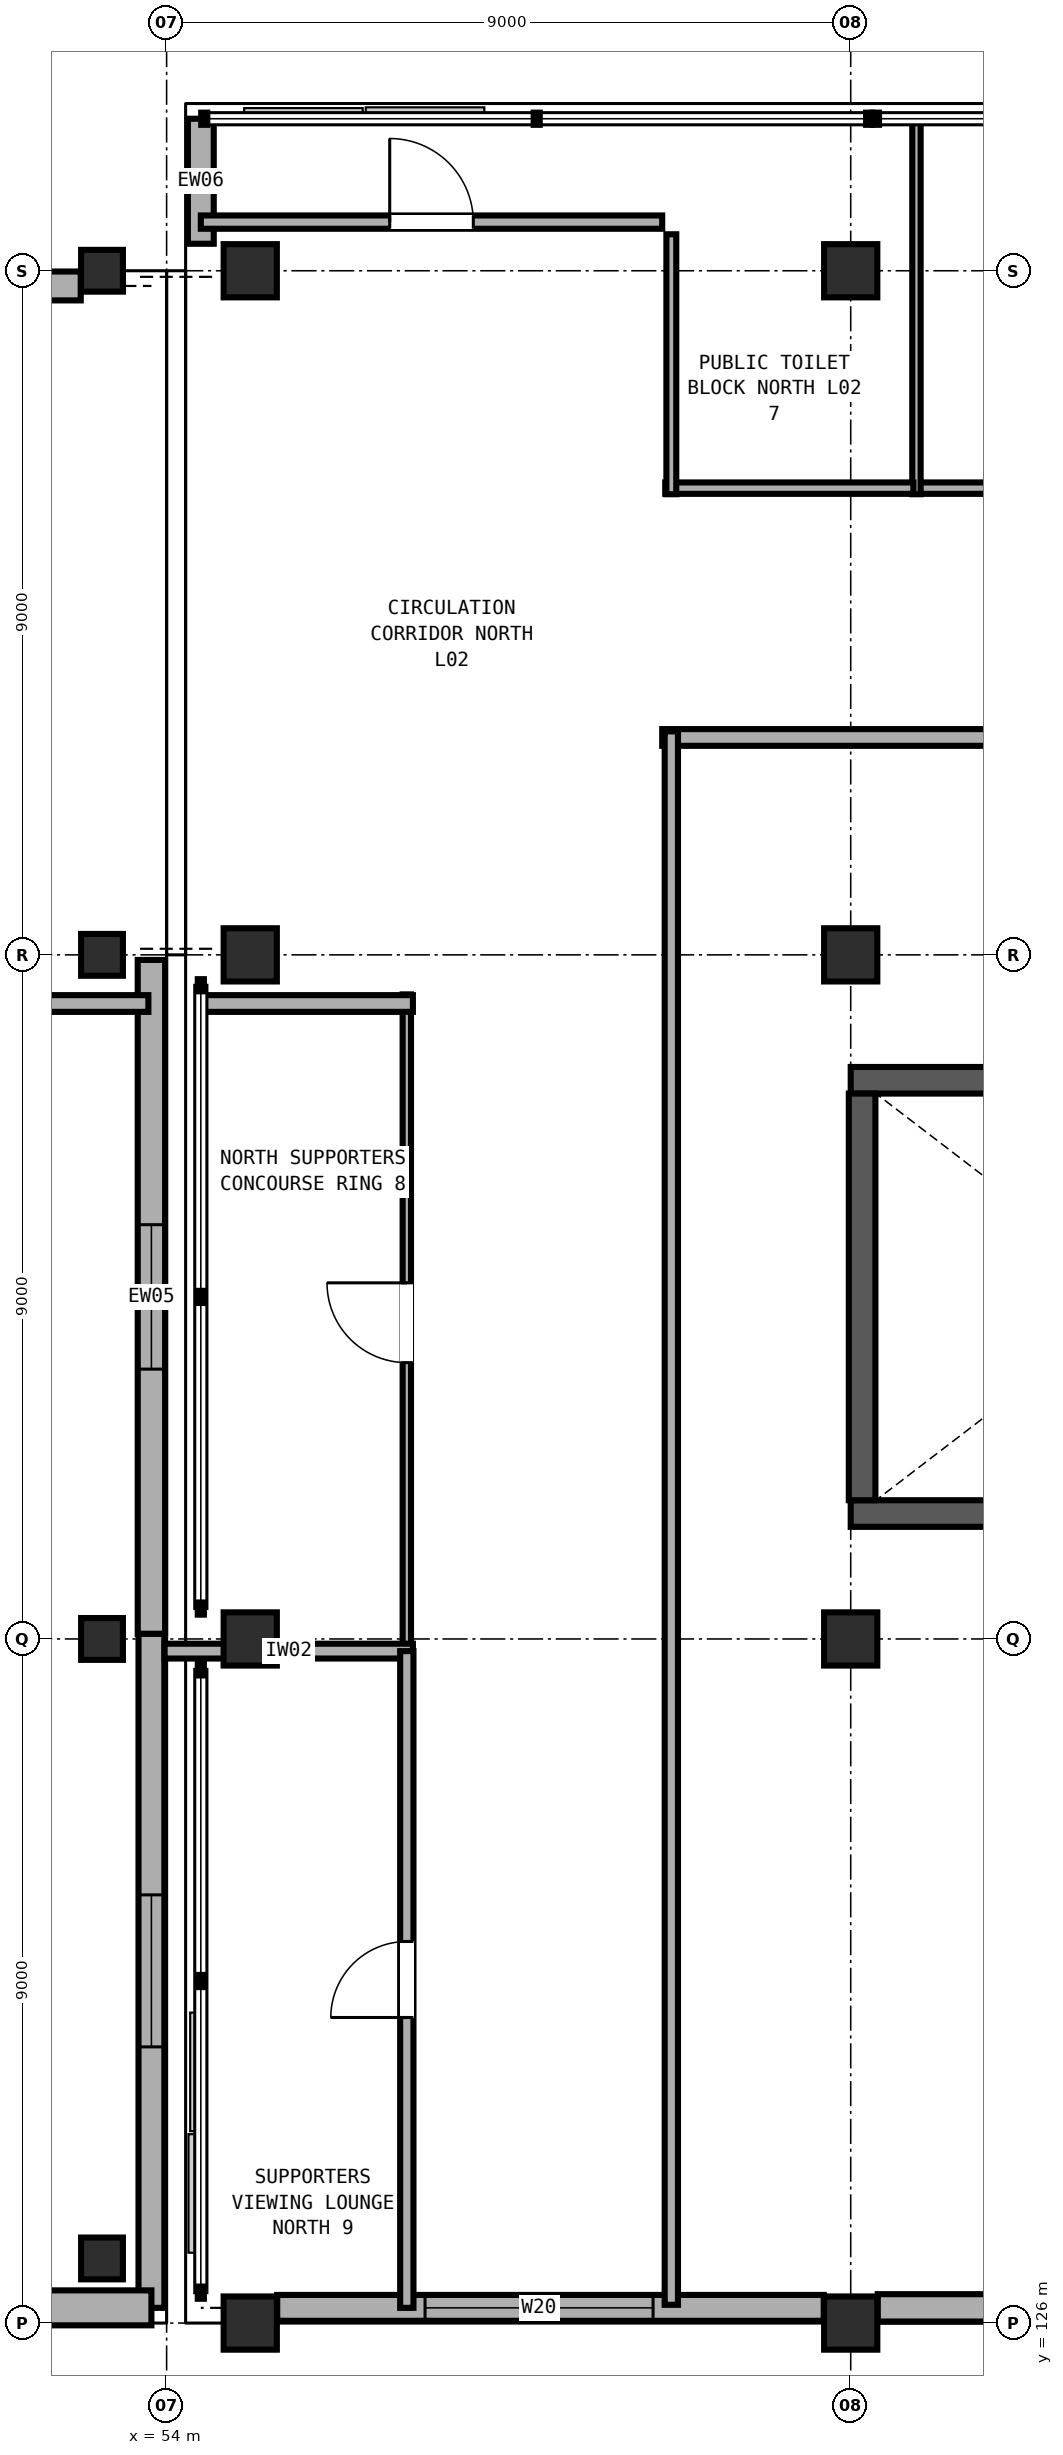
"""IFC4 building model, lengths in metres.
Left out: names, types, materials, properties, quantities, classifications, styles, units other than length and angle.
Written with IfcOpenShell. Run it as: python <this file> out.ifc"""

import sys

from ifc_helpers import new_model, si_unit, direction, frame, frame_2d, origin, origin_2d, place, context, subcontext, project, spatial, rectangle, extrude, element, fill, save


model = new_model("IFC4")
c1 = context("Model", 3, precision=1e-05, world=origin(), true_north=direction((0.0, 1.0)))
c2 = subcontext(c1, "Body", "Model", "MODEL_VIEW")
j1 = project(units=[si_unit("LENGTHUNIT", "METRE"), si_unit("PLANEANGLEUNIT", "RADIAN")], contexts=[c1])
p1 = place(None, origin())
s1 = spatial("IfcSite", under=j1, at=p1, CompositionType="ELEMENT")
p2 = place(p1, origin())
s2 = spatial("IfcBuilding", under=s1, at=p2, CompositionType="ELEMENT")
p3 = place(p2, frame((0.0, 0.0, 9.6)))
s3 = spatial("IfcBuildingStorey", under=s2, at=p3, CompositionType="ELEMENT", Elevation=9.6)
for number, where, z_axis, x_axis in (
    (1, (55.1, 126.0, 0.0), (0.0, 0.0, 1.0), (1.0, 0.0, 0.0)),
    (2, (55.1, 135.0, 0.0), (0.0, 0.0, 1.0), (1.0, 0.0, 0.0)),
    (3, (55.1, 144.0, 0.0), (0.0, 0.0, 1.0), (1.0, 0.0, 0.0)),
    (4, (55.1, 153.0, 0.0), (0.0, 0.0, 1.0), (1.0, 0.0, 0.0)),
    (5, (63.0, 126.0, 0.0), (0.0, 0.0, 1.0), (1.0, 0.0, 0.0)),
    (6, (63.0, 135.0, 0.0), (0.0, 0.0, 1.0), (1.0, 0.0, 0.0)),
    (7, (63.0, 144.0, 0.0), (0.0, 0.0, 1.0), (1.0, 0.0, 0.0)),
    (8, (63.0, 153.0, 0.0), (0.0, 0.0, 1.0), (1.0, 0.0, 0.0)),
):
    element("IfcColumn", number, at=place(p3, frame(where, z_axis=z_axis, x_axis=x_axis)), inside=s3, PredefinedType="COLUMN", context=c2, shape_type="SweptSolid", body=[
        extrude(rectangle(XDim=0.7, YDim=0.7, at=origin_2d()), origin(), (0.0, 0.0, 1.0), 4.8),
    ])
for number, where, z_axis, x_axis in (
    (9, (53.15, 126.85, 0.0), (0.0, 0.0, 1.0), (1.0, 0.0, 0.0)),
    (10, (53.15, 135.0, 0.0), (0.0, 0.0, 1.0), (1.0, 0.0, 0.0)),
    (11, (53.15, 144.0, 0.0), (0.0, 0.0, 1.0), (1.0, 0.0, 0.0)),
    (12, (53.15, 153.0, 0.0), (0.0, 0.0, 1.0), (1.0, 0.0, 0.0)),
):
    element("IfcColumn", number, at=place(p3, frame(where, z_axis=z_axis, x_axis=x_axis)), inside=s3, PredefinedType="COLUMN", context=c2, shape_type="SweptSolid", body=[
        extrude(rectangle(XDim=0.55, YDim=0.55, at=origin_2d()), origin(), (0.0, 0.0, 1.0), 4.8),
    ])
p4 = place(p3, frame((63.0, 136.65, 0.0), z_axis=(0.0, 0.0, 1.0), x_axis=(1.0, 0.0, 0.0)))
e13 = element("IfcWall", 13, at=p4, inside=s3, PredefinedType="SHEAR", context=c2, shape_type="SweptSolid", body=[
    extrude(rectangle(XDim=18.0, YDim=0.35, at=frame_2d((9.0, 0.0))), origin(), (0.0, 0.0, 1.0), 4.5),
])
p5 = place(p3, frame((81.0, 142.35, 0.0), z_axis=(0.0, 0.0, 1.0), x_axis=(-1.0, 0.0, 0.0)))
e14 = element("IfcWall", 14, at=p5, inside=s3, PredefinedType="SHEAR", context=c2, shape_type="SweptSolid", body=[
    extrude(rectangle(XDim=18.0, YDim=0.35, at=frame_2d((9.0, 0.0))), origin(), (0.0, 0.0, 1.0), 4.5),
])
p6 = place(p5, frame((4.7, 0.0, 0.0)))
e15 = element("IfcOpeningElement", 15, at=p6, cuts=e14, PredefinedType="OPENING", context=c2, shape_type="SweptSolid", body=[
    extrude(rectangle(XDim=1.9, YDim=2.25, at=frame_2d((0.95, 1.125))), frame((0.0, 0.185, 0.0), z_axis=(0.0, -1.0, 0.0), x_axis=(1.0, 0.0, 0.0)), (0.0, 0.0, 1.0), 0.37),
])
p7 = place(p3, frame((63.15, 142.175, 0.0), z_axis=(0.0, 0.0, 1.0), x_axis=(0.0, -1.0, 0.0)))
e16 = element("IfcWall", 16, at=p7, inside=s3, PredefinedType="SHEAR", context=c2, shape_type="SweptSolid", body=[
    extrude(rectangle(XDim=5.35, YDim=0.35, at=frame_2d((2.675, 0.0))), origin(), (0.0, 0.0, 1.0), 4.5),
])
p8 = place(p3, frame((54.45, 153.355, 0.0), z_axis=(0.0, 0.0, 1.0), x_axis=(0.0, 1.0, 0.0)))
e17 = element("IfcWall", 17, at=p8, inside=s3, PredefinedType="SOLIDWALL", context=c2, shape_type="SweptSolid", body=[
    extrude(rectangle(XDim=1.645, YDim=0.34, at=frame_2d((0.823, 0.0))), origin(), (0.0, 0.0, 1.0), 3.58),
])
p9 = place(p3, frame((71.645, 126.2, 0.0), z_axis=(0.0, 0.0, 1.0), x_axis=(-1.0, 0.0, 0.0)))
e18 = element("IfcWall", 18, at=p9, inside=s3, PredefinedType="SOLIDWALL", context=c2, shape_type="SweptSolid", body=[
    extrude(rectangle(XDim=8.29, YDim=0.36, at=frame_2d((4.145, 0.0))), origin(), (0.0, 0.0, 1.0), 3.58),
])
p10 = place(p9, frame((2.695, 0.0, 0.9)))
e19 = element("IfcOpeningElement", 19, at=p10, cuts=e18, PredefinedType="OPENING", context=c2, shape_type="SweptSolid", body=[
    extrude(rectangle(XDim=2.9, YDim=2.2, at=frame_2d((1.45, 1.1))), frame((0.0, 0.19, 0.0), z_axis=(0.0, -1.0, 0.0), x_axis=(1.0, 0.0, 0.0)), (0.0, 0.0, 1.0), 0.38),
])
p11 = place(p3, frame((62.645, 126.2, 0.0), z_axis=(0.0, 0.0, 1.0), x_axis=(-1.0, 0.0, 0.0)))
e20 = element("IfcWall", 20, at=p11, inside=s3, PredefinedType="SOLIDWALL", context=c2, shape_type="SweptSolid", body=[
    extrude(rectangle(XDim=7.19, YDim=0.34, at=frame_2d((3.595, 0.0))), origin(), (0.0, 0.0, 1.0), 3.58),
])
p12 = place(p11, frame((2.245, 0.0, 0.9)))
e21 = element("IfcOpeningElement", 21, at=p12, cuts=e20, PredefinedType="OPENING", context=c2, shape_type="SweptSolid", body=[
    extrude(rectangle(XDim=3.0, YDim=2.2, at=frame_2d((1.5, 1.1))), frame((0.0, 0.18, 0.0), z_axis=(0.0, -1.0, 0.0), x_axis=(1.0, 0.0, 0.0)), (0.0, 0.0, 1.0), 0.36),
])
p13 = place(p3, frame((45.28, 152.8, 0.0), z_axis=(0.0, 0.0, 1.0), x_axis=(1.0, 0.0, 0.0)))
e22 = element("IfcWall", 22, at=p13, inside=s3, PredefinedType="SOLIDWALL", context=c2, shape_type="SweptSolid", body=[
    extrude(rectangle(XDim=7.59, YDim=0.38, at=frame_2d((3.795, 0.0))), origin(), (0.0, 0.0, 1.0), 3.58),
])
p14 = place(p13, frame((2.895, 0.0, 0.9)))
e23 = element("IfcOpeningElement", 23, at=p14, cuts=e22, PredefinedType="OPENING", context=c2, shape_type="SweptSolid", body=[
    extrude(rectangle(XDim=1.8, YDim=1.75, at=frame_2d((0.9, 0.875))), frame((0.0, 0.2, 0.0), z_axis=(0.0, -1.0, 0.0), x_axis=(1.0, 0.0, 0.0)), (0.0, 0.0, 1.0), 0.4),
])
p15 = place(p3, frame((53.8, 143.933, 0.0), z_axis=(0.0, 0.0, 1.0), x_axis=(0.0, -1.0, 0.0)))
e24 = element("IfcWall", 24, at=p15, inside=s3, PredefinedType="SOLIDWALL", context=c2, shape_type="SweptSolid", body=[
    extrude(rectangle(XDim=8.867, YDim=0.36, at=frame_2d((4.433, 0.0))), origin(), (0.0, 0.0, 1.0), 3.58),
])
p16 = place(p15, frame((3.483, 0.0, 0.9)))
e25 = element("IfcOpeningElement", 25, at=p16, cuts=e24, PredefinedType="OPENING", context=c2, shape_type="SweptSolid", body=[
    extrude(rectangle(XDim=1.9, YDim=1.8, at=frame_2d((0.95, 0.9))), frame((0.0, 0.19, 0.0), z_axis=(0.0, -1.0, 0.0), x_axis=(1.0, 0.0, 0.0)), (0.0, 0.0, 1.0), 0.38),
])
p17 = place(p3, frame((53.8, 135.067, 0.0), z_axis=(0.0, 0.0, 1.0), x_axis=(0.0, -1.0, 0.0)))
e26 = element("IfcWall", 26, at=p17, inside=s3, PredefinedType="SOLIDWALL", context=c2, shape_type="SweptSolid", body=[
    extrude(rectangle(XDim=8.867, YDim=0.34, at=frame_2d((4.433, 0.0))), origin(), (0.0, 0.0, 1.0), 3.58),
])
p18 = place(p17, frame((3.433, 0.0, 0.9)))
e27 = element("IfcOpeningElement", 27, at=p18, cuts=e26, PredefinedType="OPENING", context=c2, shape_type="SweptSolid", body=[
    extrude(rectangle(XDim=2.0, YDim=1.85, at=frame_2d((1.0, 0.925))), frame((0.0, 0.18, 0.0), z_axis=(0.0, -1.0, 0.0), x_axis=(1.0, 0.0, 0.0)), (0.0, 0.0, 1.0), 0.36),
])
p19 = place(p3, frame((53.8, 126.2, 0.0), z_axis=(0.0, 0.0, 1.0), x_axis=(-1.0, 0.0, 0.0)))
e28 = element("IfcWall", 28, at=p19, inside=s3, PredefinedType="SOLIDWALL", context=c2, shape_type="SweptSolid", body=[
    extrude(rectangle(XDim=8.92, YDim=0.46, at=frame_2d((4.46, 0.0))), origin(), (0.0, 0.0, 1.0), 3.58),
])
p20 = place(p19, frame((3.41, 0.0, 0.9)))
e29 = element("IfcOpeningElement", 29, at=p20, cuts=e28, PredefinedType="OPENING", context=c2, shape_type="SweptSolid", body=[
    extrude(rectangle(XDim=2.1, YDim=1.9, at=frame_2d((1.05, 0.95))), frame((0.0, 0.24, 0.0), z_axis=(0.0, -1.0, 0.0), x_axis=(1.0, 0.0, 0.0)), (0.0, 0.0, 1.0), 0.48),
])
p21 = place(p3, frame((73.28, 146.86, 0.0), z_axis=(0.0, 0.0, 1.0), x_axis=(-1.0, 0.0, 0.0)))
e30 = element("IfcWall", 30, at=p21, inside=s3, PredefinedType="PARTITIONING", context=c2, shape_type="SweptSolid", body=[
    extrude(rectangle(XDim=12.76, YDim=0.22, at=frame_2d((6.38, 0.0))), origin(), (0.0, 0.0, 1.0), 3.56),
])
p22 = place(p21, frame((5.605, 0.0, 0.0)))
e31 = element("IfcOpeningElement", 31, at=p22, cuts=e30, PredefinedType="OPENING", context=c2, shape_type="SweptSolid", body=[
    extrude(rectangle(XDim=1.55, YDim=2.2, at=frame_2d((0.775, 1.1))), frame((0.0, 0.12, 0.0), z_axis=(0.0, -1.0, 0.0), x_axis=(1.0, 0.0, 0.0)), (0.0, 0.0, 1.0), 0.24),
])
p23 = place(p3, frame((60.64, 126.24, 0.0), z_axis=(0.0, 0.0, 1.0), x_axis=(0.0, 1.0, 0.0)))
e32 = element("IfcWall", 32, at=p23, inside=s3, PredefinedType="PARTITIONING", context=c2, shape_type="SweptSolid", body=[
    extrude(rectangle(XDim=20.7, YDim=0.175, at=frame_2d((10.35, 0.0))), origin(), (0.0, 0.0, 1.0), 3.56),
])
p24 = place(p3, frame((63.865, 150.14, 0.0), z_axis=(0.0, 0.0, 1.0), x_axis=(1.0, 0.0, 0.0)))
e33 = element("IfcWall", 33, at=p24, inside=s3, PredefinedType="PARTITIONING", context=c2, shape_type="SweptSolid", body=[
    extrude(rectangle(XDim=9.415, YDim=0.15, at=frame_2d((4.708, 0.0))), origin(), (0.0, 0.0, 1.0), 3.56),
])
p25 = place(p24, frame((4.083, 0.0, 0.0)))
e34 = element("IfcOpeningElement", 34, at=p25, cuts=e33, PredefinedType="OPENING", context=c2, shape_type="SweptSolid", body=[
    extrude(rectangle(XDim=1.25, YDim=2.15, at=frame_2d((0.625, 1.075))), frame((0.0, 0.085, 0.0), z_axis=(0.0, -1.0, 0.0), x_axis=(1.0, 0.0, 0.0)), (0.0, 0.0, 1.0), 0.17),
])
p26 = place(p3, frame((63.865, 150.06, 0.0), z_axis=(0.0, 0.0, 1.0), x_axis=(0.0, 1.0, 0.0)))
e35 = element("IfcWall", 35, at=p26, inside=s3, PredefinedType="PARTITIONING", context=c2, shape_type="SweptSolid", body=[
    extrude(rectangle(XDim=4.907, YDim=0.11, at=frame_2d((2.454, 0.0))), origin(), (0.0, 0.0, 1.0), 3.56),
])
p27 = place(p3, frame((54.45, 153.64, 0.0), z_axis=(0.0, 0.0, 1.0), x_axis=(1.0, 0.0, 0.0)))
e36 = element("IfcWall", 36, at=p27, inside=s3, PredefinedType="PARTITIONING", context=c2, shape_type="SweptSolid", body=[
    extrude(rectangle(XDim=6.07, YDim=0.175, at=frame_2d((3.035, 0.0))), origin(), (0.0, 0.0, 1.0), 3.56),
])
p28 = place(p27, frame((2.485, 0.0, 0.0)))
e37 = element("IfcOpeningElement", 37, at=p28, cuts=e36, PredefinedType="OPENING", context=c2, shape_type="SweptSolid", body=[
    extrude(rectangle(XDim=1.1, YDim=2.1, at=frame_2d((0.55, 1.05))), frame((0.0, 0.097, 0.0), z_axis=(0.0, -1.0, 0.0), x_axis=(1.0, 0.0, 0.0)), (0.0, 0.0, 1.0), 0.195),
])
p29 = place(p3, frame((63.825, 150.14, 0.0), z_axis=(0.0, 0.0, 1.0), x_axis=(-1.0, 0.0, 0.0)))
e38 = element("IfcWall", 38, at=p29, inside=s3, PredefinedType="PARTITIONING", context=c2, shape_type="SweptSolid", body=[
    extrude(rectangle(XDim=3.265, YDim=0.15, at=frame_2d((1.632, 0.0))), origin(), (0.0, 0.0, 1.0), 3.56),
])
p30 = place(p3, frame((60.64, 150.06, 0.0), z_axis=(0.0, 0.0, 1.0), x_axis=(0.0, 1.0, 0.0)))
e39 = element("IfcWall", 39, at=p30, inside=s3, PredefinedType="PARTITIONING", context=c2, shape_type="SweptSolid", body=[
    extrude(rectangle(XDim=3.42, YDim=0.13, at=frame_2d((1.71, 0.0))), origin(), (0.0, 0.0, 1.0), 3.56),
])
p31 = place(p3, frame((57.16, 134.84, 0.0), z_axis=(0.0, 0.0, 1.0), x_axis=(0.0, 1.0, 0.0)))
e40 = element("IfcWall", 40, at=p31, inside=s3, PredefinedType="PARTITIONING", context=c2, shape_type="SweptSolid", body=[
    extrude(rectangle(XDim=8.64, YDim=0.11, at=frame_2d((4.32, 0.0))), origin(), (0.0, 0.0, 1.0), 3.56),
])
p32 = place(p31, frame((3.795, 0.0, 0.0)))
e41 = element("IfcOpeningElement", 41, at=p32, cuts=e40, PredefinedType="OPENING", context=c2, shape_type="SweptSolid", body=[
    extrude(rectangle(XDim=1.05, YDim=2.1, at=frame_2d((0.525, 1.05))), frame((0.0, 0.065, 0.0), z_axis=(0.0, -1.0, 0.0), x_axis=(1.0, 0.0, 0.0)), (0.0, 0.0, 1.0), 0.13),
])
p33 = place(p3, frame((54.483, 143.36, 0.0), z_axis=(0.0, 0.0, 1.0), x_axis=(1.0, 0.0, 0.0)))
e42 = element("IfcWall", 42, at=p33, inside=s3, PredefinedType="PARTITIONING", context=c2, shape_type="SweptSolid", body=[
    extrude(rectangle(XDim=2.757, YDim=0.22, at=frame_2d((1.378, 0.0))), origin(), (0.0, 0.0, 1.0), 3.56),
])
p34 = place(p3, frame((57.24, 134.84, 0.0), z_axis=(0.0, 0.0, 1.0), x_axis=(-1.0, 0.0, 0.0)))
e43 = element("IfcWall", 43, at=p34, inside=s3, PredefinedType="PARTITIONING", context=c2, shape_type="SweptSolid", body=[
    extrude(rectangle(XDim=3.267, YDim=0.195, at=frame_2d((1.634, 0.0))), origin(), (0.0, 0.0, 1.0), 3.56),
])
p35 = place(p3, frame((57.16, 126.2, 0.0), z_axis=(0.0, 0.0, 1.0), x_axis=(0.0, 1.0, 0.0)))
e44 = element("IfcWall", 44, at=p35, inside=s3, PredefinedType="PARTITIONING", context=c2, shape_type="SweptSolid", body=[
    extrude(rectangle(XDim=8.64, YDim=0.175, at=frame_2d((4.32, 0.0))), origin(), (0.0, 0.0, 1.0), 3.56),
])
p36 = place(p35, frame((3.82, 0.0, 0.0)))
e45 = element("IfcOpeningElement", 45, at=p36, cuts=e44, PredefinedType="OPENING", context=c2, shape_type="SweptSolid", body=[
    extrude(rectangle(XDim=1.0, YDim=2.1, at=frame_2d((0.5, 1.05))), frame((0.0, 0.097, 0.0), z_axis=(0.0, -1.0, 0.0), x_axis=(1.0, 0.0, 0.0)), (0.0, 0.0, 1.0), 0.195),
])
p37 = place(p3, frame((50.75, 143.36, 0.0), z_axis=(0.0, 0.0, 1.0), x_axis=(1.0, 0.0, 0.0)))
e46 = element("IfcWall", 46, at=p37, inside=s3, PredefinedType="PARTITIONING", context=c2, shape_type="SweptSolid", body=[
    extrude(rectangle(XDim=3.01, YDim=0.22, at=frame_2d((1.505, 0.0))), origin(), (0.0, 0.0, 1.0), 3.56),
])
p38 = place(p12, origin())
e47 = element("IfcWindow", 47, at=p38, inside=s3, PartitioningType="DOUBLE_PANEL_VERTICAL", PredefinedType="WINDOW", context=c2, shape_type="SweptSolid", body=[
    extrude(rectangle(XDim=3.0, YDim=2.2, at=frame_2d((1.5, 1.1))), frame((0.0, 0.03, 0.0), z_axis=(0.0, -1.0, 0.0), x_axis=(1.0, 0.0, 0.0)), (0.0, 0.0, 1.0), 0.06),
])
fill(e21, e47)
p39 = place(p16, origin())
e48 = element("IfcWindow", 48, at=p39, inside=s3, PartitioningType="DOUBLE_PANEL_VERTICAL", PredefinedType="WINDOW", context=c2, shape_type="SweptSolid", body=[
    extrude(rectangle(XDim=1.9, YDim=1.8, at=frame_2d((0.95, 0.9))), frame((0.0, 0.03, 0.0), z_axis=(0.0, -1.0, 0.0), x_axis=(1.0, 0.0, 0.0)), (0.0, 0.0, 1.0), 0.06),
])
fill(e25, e48)
p40 = place(p18, origin())
e49 = element("IfcWindow", 49, at=p40, inside=s3, PartitioningType="DOUBLE_PANEL_VERTICAL", PredefinedType="WINDOW", context=c2, shape_type="SweptSolid", body=[
    extrude(rectangle(XDim=2.0, YDim=1.85, at=frame_2d((1.0, 0.925))), frame((0.0, 0.03, 0.0), z_axis=(0.0, -1.0, 0.0), x_axis=(1.0, 0.0, 0.0)), (0.0, 0.0, 1.0), 0.06),
])
fill(e27, e49)
p41 = place(p28, origin())
e50 = element("IfcDoor", 50, at=p41, inside=s3, OperationType="SINGLE_SWING_LEFT", PredefinedType="DOOR", context=c2, shape_type="SweptSolid", body=[
    extrude(rectangle(XDim=1.1, YDim=2.1, at=frame_2d((0.55, 1.05))), frame((0.0, 0.025, 0.0), z_axis=(0.0, -1.0, 0.0), x_axis=(1.0, 0.0, 0.0)), (0.0, 0.0, 1.0), 0.05),
])
fill(e37, e50)
p42 = place(p32, origin())
e51 = element("IfcDoor", 51, at=p42, inside=s3, OperationType="SINGLE_SWING_RIGHT", PredefinedType="DOOR", context=c2, shape_type="SweptSolid", body=[
    extrude(rectangle(XDim=1.05, YDim=2.1, at=frame_2d((0.525, 1.05))), frame((0.0, 0.025, 0.0), z_axis=(0.0, -1.0, 0.0), x_axis=(1.0, 0.0, 0.0)), (0.0, 0.0, 1.0), 0.05),
])
fill(e41, e51)
p43 = place(p36, origin())
e52 = element("IfcDoor", 52, at=p43, inside=s3, OperationType="SINGLE_SWING_LEFT", PredefinedType="DOOR", context=c2, shape_type="SweptSolid", body=[
    extrude(rectangle(XDim=1.0, YDim=2.1, at=frame_2d((0.5, 1.05))), frame((0.0, 0.025, 0.0), z_axis=(0.0, -1.0, 0.0), x_axis=(1.0, 0.0, 0.0)), (0.0, 0.0, 1.0), 0.05),
])
fill(e45, e52)
save(model, sys.argv[1])
